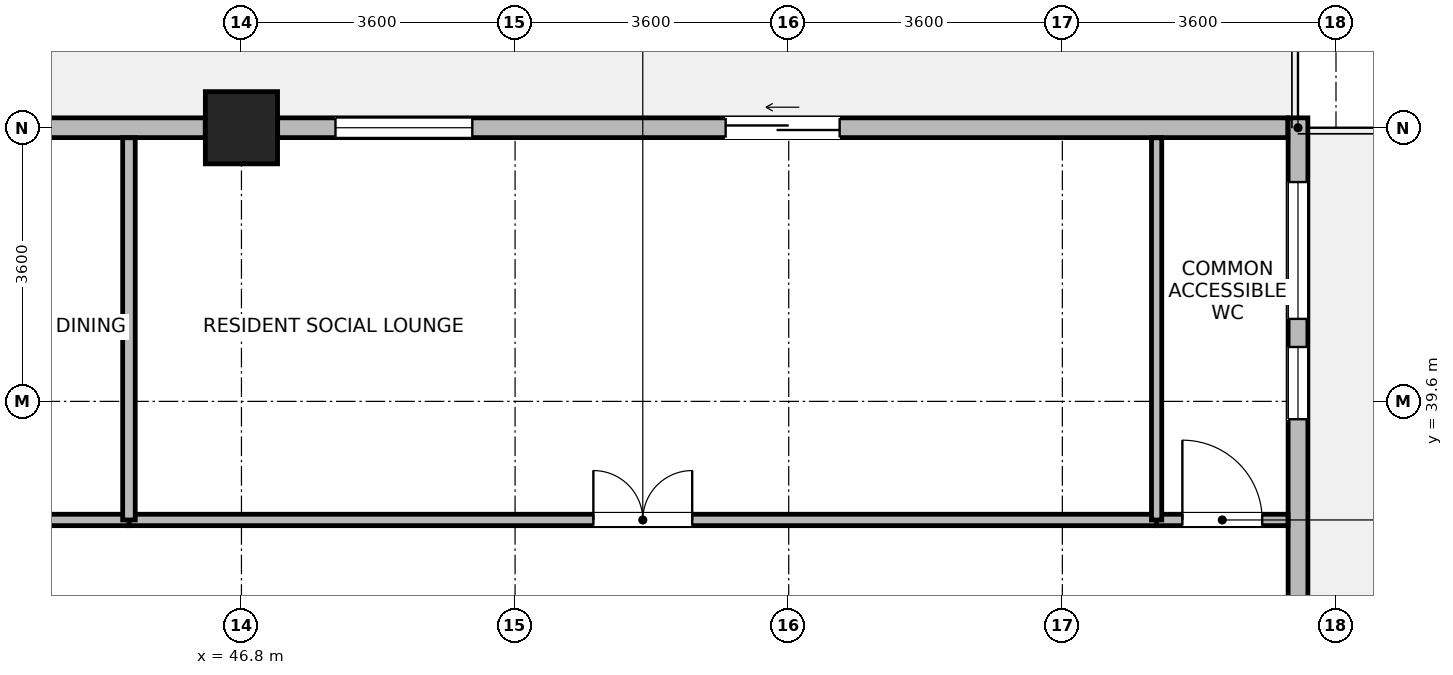
"""IFC4 building model, lengths in metres.
Left out: names, types, materials, properties, quantities, classifications, styles, units other than length and angle.
Written with IfcOpenShell. Run it as: python <this file> out.ifc"""

import sys

from ifc_helpers import new_model, si_unit, direction, frame, frame_2d, origin, origin_2d, place, context, subcontext, project, spatial, rectangle, extrude, source, transform, mapped, element, fill, save


model = new_model("IFC4")
c1 = context("Model", 3, precision=1e-05, world=origin(), true_north=direction((0.0, 1.0)))
c2 = subcontext(c1, "Body", "Model", "MODEL_VIEW")
j1 = project(units=[si_unit("LENGTHUNIT", "METRE"), si_unit("PLANEANGLEUNIT", "RADIAN")], contexts=[c1])
p1 = place(None, origin())
s1 = spatial("IfcSite", under=j1, at=p1, CompositionType="ELEMENT")
p2 = place(p1, origin())
s2 = spatial("IfcBuilding", under=s1, at=p2, CompositionType="ELEMENT")
p3 = place(p2, frame((0.0, 0.0, 216.6)))
s3 = spatial("IfcBuildingStorey", under=s2, at=p3, CompositionType="ELEMENT", Elevation=216.6)
m1 = source(origin(), c2, "Body", "SweptSolid", [
    extrude(rectangle(XDim=0.95, YDim=0.95, at=origin_2d()), origin(), (0.0, 0.0, 1.0), 3.7),
])
p4 = place(p3, frame((46.8, 43.2, 0.0), z_axis=(0.0, 0.0, 1.0), x_axis=(1.0, 0.0, 0.0)))
e1 = element("IfcColumn", 1, at=p4, inside=s3, PredefinedType="COLUMN", context=c2, shape_type="MappedRepresentation", body=[
    mapped(m1, transform((0.0, 0.0, 0.0), x_axis=(1.0, 0.0, 0.0), y_axis=(0.0, 1.0, 0.0), z_axis=(0.0, 0.0, 1.0), scale=1.0)),
])
p5 = place(p3, frame((60.7, 43.33, 0.0), z_axis=(0.0, 0.0, 1.0), x_axis=(0.0, -1.0, 0.0)))
e2 = element("IfcWall", 2, at=p5, inside=s3, PredefinedType="STANDARD", context=c2, shape_type="SweptSolid", body=[
    extrude(rectangle(XDim=6.979, YDim=0.26, at=frame_2d((3.49, 0.0))), origin(), (0.0, 0.0, 1.0), 3.45),
])
p6 = place(p5, frame((0.845, 0.0, 0.85)))
e3 = element("IfcOpeningElement", 3, at=p6, cuts=e2, PredefinedType="OPENING", context=c2, shape_type="SweptSolid", body=[
    extrude(rectangle(XDim=1.8, YDim=1.85, at=frame_2d((0.9, 0.925))), frame((0.0, 0.14, 0.0), z_axis=(0.0, -1.0, 0.0), x_axis=(1.0, 0.0, 0.0)), (0.0, 0.0, 1.0), 0.28),
])
p7 = place(p5, frame((3.014, 0.0, 0.85)))
e4 = element("IfcOpeningElement", 4, at=p7, cuts=e2, PredefinedType="OPENING", context=c2, shape_type="SweptSolid", body=[
    extrude(rectangle(XDim=0.95, YDim=1.75, at=frame_2d((0.475, 0.875))), frame((0.0, 0.14, 0.0), z_axis=(0.0, -1.0, 0.0), x_axis=(1.0, 0.0, 0.0)), (0.0, 0.0, 1.0), 0.28),
])
p8 = place(p3, frame((47.276, 43.2, 0.0), z_axis=(0.0, 0.0, 1.0), x_axis=(1.0, 0.0, 0.0)))
e5 = element("IfcWall", 5, at=p8, inside=s3, PredefinedType="STANDARD", context=c2, shape_type="SweptSolid", body=[
    extrude(rectangle(XDim=13.289, YDim=0.26, at=frame_2d((6.645, 0.0))), origin(), (0.0, 0.0, 1.0), 3.45),
])
p9 = place(p8, frame((5.894, 0.0, 0.0)))
e6 = element("IfcOpeningElement", 6, at=p9, cuts=e5, PredefinedType="OPENING", context=c2, shape_type="SweptSolid", body=[
    extrude(rectangle(XDim=1.5, YDim=2.15, at=frame_2d((0.75, 1.075))), frame((0.0, 0.14, 0.0), z_axis=(0.0, -1.0, 0.0), x_axis=(1.0, 0.0, 0.0)), (0.0, 0.0, 1.0), 0.28),
])
p10 = place(p8, frame((0.761, 0.0, 0.85)))
e7 = element("IfcOpeningElement", 7, at=p10, cuts=e5, PredefinedType="OPENING", context=c2, shape_type="SweptSolid", body=[
    extrude(rectangle(XDim=1.8, YDim=1.85, at=frame_2d((0.9, 0.925))), frame((0.0, 0.14, 0.0), z_axis=(0.0, -1.0, 0.0), x_axis=(1.0, 0.0, 0.0)), (0.0, 0.0, 1.0), 0.28),
])
p11 = place(p3, frame((36.476, 43.2, 0.0), z_axis=(0.0, 0.0, 1.0), x_axis=(1.0, 0.0, 0.0)))
e8 = element("IfcWall", 8, at=p11, inside=s3, PredefinedType="STANDARD", context=c2, shape_type="SweptSolid", body=[
    extrude(rectangle(XDim=9.848, YDim=0.26, at=frame_2d((4.924, 0.0))), origin(), (0.0, 0.0, 1.0), 3.05),
])
p12 = place(p11, frame((0.741, 0.0, 0.85)))
e9 = element("IfcOpeningElement", 9, at=p12, cuts=e8, PredefinedType="OPENING", context=c2, shape_type="SweptSolid", body=[
    extrude(rectangle(XDim=1.8, YDim=1.85, at=frame_2d((0.9, 0.925))), frame((0.0, 0.14, 0.0), z_axis=(0.0, -1.0, 0.0), x_axis=(1.0, 0.0, 0.0)), (0.0, 0.0, 1.0), 0.28),
])
p13 = place(p11, frame((4.024, 0.0, 0.85)))
e10 = element("IfcOpeningElement", 10, at=p13, cuts=e8, PredefinedType="OPENING", context=c2, shape_type="SweptSolid", body=[
    extrude(rectangle(XDim=1.8, YDim=1.85, at=frame_2d((0.9, 0.925))), frame((0.0, 0.14, 0.0), z_axis=(0.0, -1.0, 0.0), x_axis=(1.0, 0.0, 0.0)), (0.0, 0.0, 1.0), 0.28),
])
p14 = place(p3, frame((45.32, 38.04, 0.0), z_axis=(0.0, 0.0, 1.0), x_axis=(1.0, 0.0, 0.0)))
e11 = element("IfcWall", 11, at=p14, inside=s3, PredefinedType="PARTITIONING", context=c2, shape_type="SweptSolid", body=[
    extrude(rectangle(XDim=13.52, YDim=0.15, at=frame_2d((6.76, 0.0))), origin(), (0.0, 0.0, 1.0), 3.45),
])
p15 = place(p14, frame((6.11, 0.0, 0.0)))
e12 = element("IfcOpeningElement", 12, at=p15, cuts=e11, PredefinedType="OPENING", context=c2, shape_type="SweptSolid", body=[
    extrude(rectangle(XDim=1.3, YDim=2.12, at=frame_2d((0.65, 1.06))), frame((0.0, 0.085, 0.0), z_axis=(0.0, -1.0, 0.0), x_axis=(1.0, 0.0, 0.0)), (0.0, 0.0, 1.0), 0.17),
])
p16 = place(p3, frame((33.64, 38.04, 0.0), z_axis=(0.0, 0.0, 1.0), x_axis=(1.0, 0.0, 0.0)))
e13 = element("IfcWall", 13, at=p16, inside=s3, PredefinedType="PARTITIONING", context=c2, shape_type="SweptSolid", body=[
    extrude(rectangle(XDim=11.68, YDim=0.15, at=frame_2d((5.84, 0.0))), origin(), (0.0, 0.0, 1.0), 3.45),
])
p17 = place(p16, frame((5.39, 0.0, 0.0)))
e14 = element("IfcOpeningElement", 14, at=p17, cuts=e13, PredefinedType="OPENING", context=c2, shape_type="SweptSolid", body=[
    extrude(rectangle(XDim=0.9, YDim=2.08, at=frame_2d((0.45, 1.04))), frame((0.0, 0.085, 0.0), z_axis=(0.0, -1.0, 0.0), x_axis=(1.0, 0.0, 0.0)), (0.0, 0.0, 1.0), 0.17),
])
p18 = place(p3, frame((58.84, 38.04, 0.0), z_axis=(0.0, 0.0, 1.0), x_axis=(1.0, 0.0, 0.0)))
e15 = element("IfcWall", 15, at=p18, inside=s3, PredefinedType="PARTITIONING", context=c2, shape_type="SweptSolid", body=[
    extrude(rectangle(XDim=1.728, YDim=0.15, at=frame_2d((0.864, 0.0))), origin(), (0.0, 0.0, 1.0), 3.45),
])
p19 = place(p18, frame((0.339, 0.0, 0.0)))
e16 = element("IfcOpeningElement", 16, at=p19, cuts=e15, PredefinedType="OPENING", context=c2, shape_type="SweptSolid", body=[
    extrude(rectangle(XDim=1.05, YDim=2.12, at=frame_2d((0.525, 1.06))), frame((0.0, 0.085, 0.0), z_axis=(0.0, -1.0, 0.0), x_axis=(1.0, 0.0, 0.0)), (0.0, 0.0, 1.0), 0.17),
])
p20 = place(p3, frame((45.32, 38.04, 0.0), z_axis=(0.0, 0.0, 1.0), x_axis=(0.0, 1.0, 0.0)))
e17 = element("IfcWall", 17, at=p20, inside=s3, PredefinedType="PARTITIONING", context=c2, shape_type="SweptSolid", body=[
    extrude(rectangle(XDim=5.028, YDim=0.165, at=frame_2d((2.514, 0.0))), origin(), (0.0, 0.0, 1.0), 3.45),
])
p21 = place(p3, frame((58.84, 38.04, 0.0), z_axis=(0.0, 0.0, 1.0), x_axis=(0.0, 1.0, 0.0)))
e18 = element("IfcWall", 18, at=p21, inside=s3, PredefinedType="PARTITIONING", context=c2, shape_type="SweptSolid", body=[
    extrude(rectangle(XDim=5.028, YDim=0.135, at=frame_2d((2.514, 0.0))), origin(), (0.0, 0.0, 1.0), 3.45),
])
p22 = place(p6, origin())
e19 = element("IfcWindow", 19, at=p22, inside=s3, PartitioningType="SINGLE_PANEL", PredefinedType="WINDOW", context=c2, shape_type="SweptSolid", body=[
    extrude(rectangle(XDim=1.8, YDim=1.85, at=frame_2d((0.9, 0.925))), frame((0.0, 0.03, 0.0), z_axis=(0.0, -1.0, 0.0), x_axis=(1.0, 0.0, 0.0)), (0.0, 0.0, 1.0), 0.06),
])
fill(e3, e19)
p23 = place(p7, origin())
e20 = element("IfcWindow", 20, at=p23, inside=s3, PartitioningType="SINGLE_PANEL", PredefinedType="WINDOW", context=c2, shape_type="SweptSolid", body=[
    extrude(rectangle(XDim=0.95, YDim=1.75, at=frame_2d((0.475, 0.875))), frame((0.0, 0.03, 0.0), z_axis=(0.0, -1.0, 0.0), x_axis=(1.0, 0.0, 0.0)), (0.0, 0.0, 1.0), 0.06),
])
fill(e4, e20)
p24 = place(p9, origin())
e21 = element("IfcDoor", 21, at=p24, inside=s3, OperationType="SLIDING_TO_LEFT", PredefinedType="DOOR", context=c2, shape_type="SweptSolid", body=[
    extrude(rectangle(XDim=1.5, YDim=2.15, at=frame_2d((0.75, 1.075))), frame((0.0, 0.025, 0.0), z_axis=(0.0, -1.0, 0.0), x_axis=(1.0, 0.0, 0.0)), (0.0, 0.0, 1.0), 0.05),
])
fill(e6, e21)
p25 = place(p10, origin())
e22 = element("IfcWindow", 22, at=p25, inside=s3, PartitioningType="SINGLE_PANEL", PredefinedType="WINDOW", context=c2, shape_type="SweptSolid", body=[
    extrude(rectangle(XDim=1.8, YDim=1.85, at=frame_2d((0.9, 0.925))), frame((0.0, 0.03, 0.0), z_axis=(0.0, -1.0, 0.0), x_axis=(1.0, 0.0, 0.0)), (0.0, 0.0, 1.0), 0.06),
])
fill(e7, e22)
p26 = place(p15, origin())
e23 = element("IfcDoor", 23, at=p26, inside=s3, OperationType="DOUBLE_DOOR_SINGLE_SWING", PredefinedType="DOOR", context=c2, shape_type="SweptSolid", body=[
    extrude(rectangle(XDim=1.3, YDim=2.12, at=frame_2d((0.65, 1.06))), frame((0.0, 0.025, 0.0), z_axis=(0.0, -1.0, 0.0), x_axis=(1.0, 0.0, 0.0)), (0.0, 0.0, 1.0), 0.05),
])
fill(e12, e23)
p27 = place(p19, origin())
e24 = element("IfcDoor", 24, at=p27, inside=s3, OperationType="SINGLE_SWING_LEFT", PredefinedType="DOOR", context=c2, shape_type="SweptSolid", body=[
    extrude(rectangle(XDim=1.05, YDim=2.12, at=frame_2d((0.525, 1.06))), frame((0.0, 0.025, 0.0), z_axis=(0.0, -1.0, 0.0), x_axis=(1.0, 0.0, 0.0)), (0.0, 0.0, 1.0), 0.05),
])
fill(e16, e24)
save(model, sys.argv[1])
